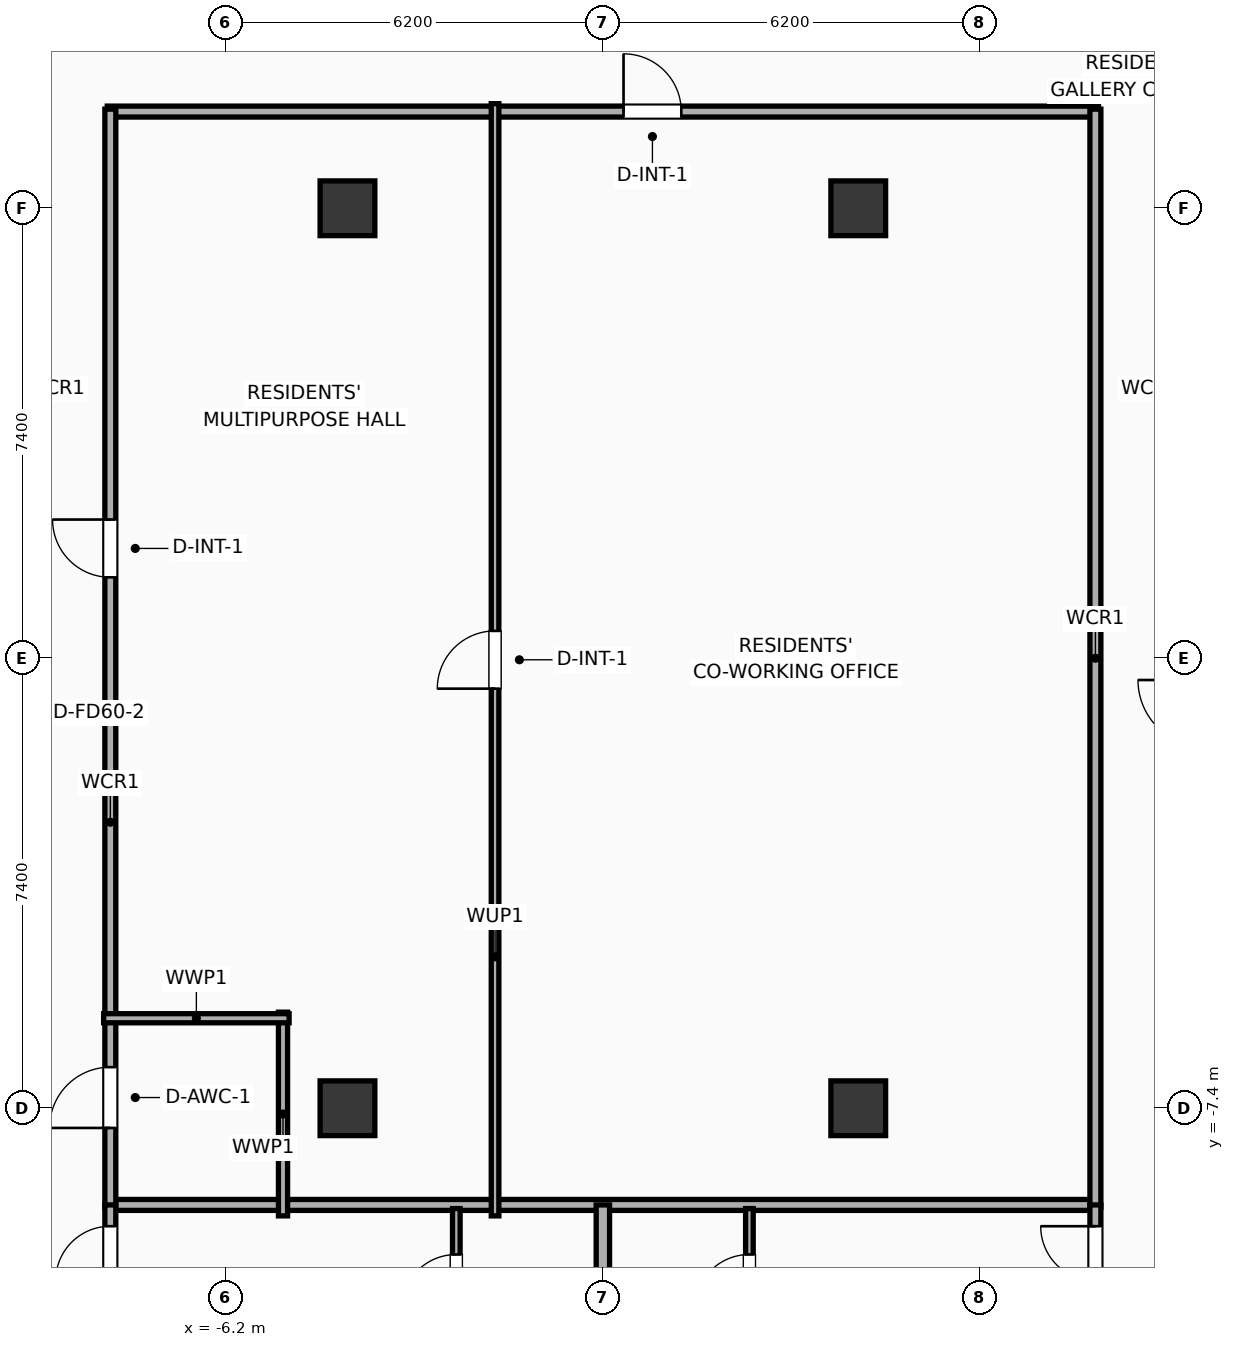
"""IFC4 building model, lengths in metres.
Left out: names, types, materials, properties, quantities, classifications, styles, units other than length and angle.
Written with IfcOpenShell. Run it as: python <this file> out.ifc"""

import sys

from ifc_helpers import new_model, si_unit, direction, frame, frame_2d, origin, origin_2d, place, context, subcontext, project, spatial, rectangle, extrude, element, fill, save


model = new_model("IFC4")
c1 = context("Model", 3, precision=1e-05, world=origin(), true_north=direction((0.0, 1.0)))
c2 = subcontext(c1, "Body", "Model", "MODEL_VIEW")
j1 = project(units=[si_unit("LENGTHUNIT", "METRE"), si_unit("PLANEANGLEUNIT", "RADIAN")], contexts=[c1])
p1 = place(None, origin())
s1 = spatial("IfcSite", under=j1, at=p1, CompositionType="ELEMENT")
p2 = place(p1, origin())
s2 = spatial("IfcBuilding", under=s1, at=p2, CompositionType="ELEMENT")
p3 = place(p2, frame((0.0, 0.0, 247.0)))
s3 = spatial("IfcBuildingStorey", under=s2, at=p3, CompositionType="ELEMENT", Elevation=247.0)
for number, where, z_axis, x_axis in (
    (1, (-4.2, -7.4, 0.0), (0.0, 0.0, 1.0), (1.0, 0.0, 0.0)),
    (2, (-4.2, 7.4, 0.0), (0.0, 0.0, 1.0), (1.0, 0.0, 0.0)),
    (3, (4.2, -7.4, 0.0), (0.0, 0.0, 1.0), (1.0, 0.0, 0.0)),
    (4, (4.2, 7.4, 0.0), (0.0, 0.0, 1.0), (1.0, 0.0, 0.0)),
):
    element("IfcColumn", number, at=place(p3, frame(where, z_axis=z_axis, x_axis=x_axis)), inside=s3, PredefinedType="COLUMN", context=c2, shape_type="SweptSolid", body=[
        extrude(rectangle(XDim=0.9, YDim=0.9, at=origin_2d()), origin(), (0.0, 0.0, 1.0), 3.9),
    ])
p4 = place(p3, frame((-8.15, 8.99, 0.0), z_axis=(0.0, 0.0, 1.0), x_axis=(1.0, 0.0, 0.0)))
e5 = element("IfcWall", 5, at=p4, inside=s3, PredefinedType="PARTITIONING", context=c2, shape_type="SweptSolid", body=[
    extrude(rectangle(XDim=16.3, YDim=0.18, at=frame_2d((8.15, 0.0))), origin(), (0.0, 0.0, 1.0), 3.65),
])
p5 = place(p4, frame((8.49, 0.0, 0.0)))
e6 = element("IfcOpeningElement", 6, at=p5, cuts=e5, PredefinedType="OPENING", context=c2, shape_type="SweptSolid", body=[
    extrude(rectangle(XDim=0.95, YDim=2.05, at=frame_2d((0.475, 1.025))), frame((0.0, 0.1, 0.0), z_axis=(0.0, -1.0, 0.0), x_axis=(1.0, 0.0, 0.0)), (0.0, 0.0, 1.0), 0.2),
])
p6 = place(p3, frame((-8.15, -8.99, 0.0), z_axis=(0.0, 0.0, 1.0), x_axis=(1.0, 0.0, 0.0)))
e7 = element("IfcWall", 7, at=p6, inside=s3, PredefinedType="PARTITIONING", context=c2, shape_type="SweptSolid", body=[
    extrude(rectangle(XDim=16.3, YDim=0.18, at=frame_2d((8.15, 0.0))), origin(), (0.0, 0.0, 1.0), 3.65),
])
p7 = place(p3, frame((-8.1, -9.03, 0.0), z_axis=(0.0, 0.0, 1.0), x_axis=(0.0, 1.0, 0.0)))
e8 = element("IfcWall", 8, at=p7, inside=s3, PredefinedType="PARTITIONING", context=c2, shape_type="SweptSolid", body=[
    extrude(rectangle(XDim=18.06, YDim=0.18, at=frame_2d((9.03, 0.0))), origin(), (0.0, 0.0, 1.0), 3.65),
])
p8 = place(p7, frame((1.306, 0.0, 0.0)))
e9 = element("IfcOpeningElement", 9, at=p8, cuts=e8, PredefinedType="OPENING", context=c2, shape_type="SweptSolid", body=[
    extrude(rectangle(XDim=1.0, YDim=2.05, at=frame_2d((0.5, 1.025))), frame((0.0, 0.1, 0.0), z_axis=(0.0, -1.0, 0.0), x_axis=(1.0, 0.0, 0.0)), (0.0, 0.0, 1.0), 0.2),
])
p9 = place(p7, frame((10.361, 0.0, 0.0)))
e10 = element("IfcOpeningElement", 10, at=p9, cuts=e8, PredefinedType="OPENING", context=c2, shape_type="SweptSolid", body=[
    extrude(rectangle(XDim=0.95, YDim=2.05, at=frame_2d((0.475, 1.025))), frame((0.0, 0.1, 0.0), z_axis=(0.0, -1.0, 0.0), x_axis=(1.0, 0.0, 0.0)), (0.0, 0.0, 1.0), 0.2),
])
p10 = place(p3, frame((8.1, -9.03, 0.0), z_axis=(0.0, 0.0, 1.0), x_axis=(0.0, 1.0, 0.0)))
e11 = element("IfcWall", 11, at=p10, inside=s3, PredefinedType="PARTITIONING", context=c2, shape_type="SweptSolid", body=[
    extrude(rectangle(XDim=18.06, YDim=0.18, at=frame_2d((9.03, 0.0))), origin(), (0.0, 0.0, 1.0), 3.65),
])
p11 = place(p3, frame((-5.26, -9.17, 0.0), z_axis=(0.0, 0.0, 1.0), x_axis=(0.0, 1.0, 0.0)))
e12 = element("IfcWall", 12, at=p11, inside=s3, PredefinedType="PLUMBINGWALL", context=c2, shape_type="SweptSolid", body=[
    extrude(rectangle(XDim=3.35, YDim=0.15, at=frame_2d((1.675, 0.0))), origin(), (0.0, 0.0, 1.0), 3.65),
])
p12 = place(p3, frame((-8.21, -5.92, 0.0), z_axis=(0.0, 0.0, 1.0), x_axis=(1.0, 0.0, 0.0)))
e13 = element("IfcWall", 13, at=p12, inside=s3, PredefinedType="PLUMBINGWALL", context=c2, shape_type="SweptSolid", body=[
    extrude(rectangle(XDim=3.05, YDim=0.15, at=frame_2d((1.525, 0.0))), origin(), (0.0, 0.0, 1.0), 3.65),
])
p13 = place(p3, frame((-1.773, -9.17, 0.0), z_axis=(0.0, 0.0, 1.0), x_axis=(0.0, 1.0, 0.0)))
e14 = element("IfcWall", 14, at=p13, inside=s3, PredefinedType="PARTITIONING", context=c2, shape_type="SweptSolid", body=[
    extrude(rectangle(XDim=18.29, YDim=0.125, at=frame_2d((9.145, 0.0))), origin(), (0.0, 0.0, 1.0), 3.65),
])
p14 = place(p13, frame((8.67, 0.0, 0.0)))
e15 = element("IfcOpeningElement", 15, at=p14, cuts=e14, PredefinedType="OPENING", context=c2, shape_type="SweptSolid", body=[
    extrude(rectangle(XDim=0.95, YDim=2.05, at=frame_2d((0.475, 1.025))), frame((0.0, 0.073, 0.0), z_axis=(0.0, -1.0, 0.0), x_axis=(1.0, 0.0, 0.0)), (0.0, 0.0, 1.0), 0.145),
])
p15 = place(p3, frame((-2.41, -11.46, 0.0), z_axis=(0.0, 0.0, 1.0), x_axis=(0.0, 1.0, 0.0)))
e16 = element("IfcWall", 16, at=p15, inside=s3, PredefinedType="PARTITIONING", context=c2, shape_type="SweptSolid", body=[
    extrude(rectangle(XDim=2.41, YDim=0.125, at=frame_2d((1.205, 0.0))), origin(), (0.0, 0.0, 1.0), 3.65),
])
p16 = place(p15, frame((0.755, 0.0, 0.0)))
e17 = element("IfcOpeningElement", 17, at=p16, cuts=e16, PredefinedType="OPENING", context=c2, shape_type="SweptSolid", body=[
    extrude(rectangle(XDim=0.9, YDim=2.05, at=frame_2d((0.45, 1.025))), frame((0.0, 0.073, 0.0), z_axis=(0.0, -1.0, 0.0), x_axis=(1.0, 0.0, 0.0)), (0.0, 0.0, 1.0), 0.145),
])
p17 = place(p3, frame((-8.1, -18.83, 0.0), z_axis=(0.0, 0.0, 1.0), x_axis=(0.0, 1.0, 0.0)))
e18 = element("IfcWall", 18, at=p17, inside=s3, PredefinedType="PARTITIONING", context=c2, shape_type="SweptSolid", body=[
    extrude(rectangle(XDim=9.84, YDim=0.18, at=frame_2d((4.92, 0.0))), origin(), (0.0, 0.0, 1.0), 3.65),
])
p18 = place(p17, frame((8.59, 0.0, 0.0)))
e19 = element("IfcOpeningElement", 19, at=p18, cuts=e18, PredefinedType="OPENING", context=c2, shape_type="SweptSolid", body=[
    extrude(rectangle(XDim=0.9, YDim=2.05, at=frame_2d((0.45, 1.025))), frame((0.0, 0.1, 0.0), z_axis=(0.0, -1.0, 0.0), x_axis=(1.0, 0.0, 0.0)), (0.0, 0.0, 1.0), 0.2),
])
p19 = place(p3, frame((2.41, -11.46, 0.0), z_axis=(0.0, 0.0, 1.0), x_axis=(0.0, 1.0, 0.0)))
e20 = element("IfcWall", 20, at=p19, inside=s3, PredefinedType="PARTITIONING", context=c2, shape_type="SweptSolid", body=[
    extrude(rectangle(XDim=2.41, YDim=0.125, at=frame_2d((1.205, 0.0))), origin(), (0.0, 0.0, 1.0), 3.65),
])
p20 = place(p19, frame((0.755, 0.0, 0.0)))
e21 = element("IfcOpeningElement", 21, at=p20, cuts=e20, PredefinedType="OPENING", context=c2, shape_type="SweptSolid", body=[
    extrude(rectangle(XDim=0.9, YDim=2.05, at=frame_2d((0.45, 1.025))), frame((0.0, 0.073, 0.0), z_axis=(0.0, -1.0, 0.0), x_axis=(1.0, 0.0, 0.0)), (0.0, 0.0, 1.0), 0.145),
])
p21 = place(p3, frame((8.1, -18.83, 0.0), z_axis=(0.0, 0.0, 1.0), x_axis=(0.0, 1.0, 0.0)))
e22 = element("IfcWall", 22, at=p21, inside=s3, PredefinedType="PARTITIONING", context=c2, shape_type="SweptSolid", body=[
    extrude(rectangle(XDim=9.84, YDim=0.18, at=frame_2d((4.92, 0.0))), origin(), (0.0, 0.0, 1.0), 3.65),
])
p22 = place(p21, frame((8.59, 0.0, 0.0)))
e23 = element("IfcOpeningElement", 23, at=p22, cuts=e22, PredefinedType="OPENING", context=c2, shape_type="SweptSolid", body=[
    extrude(rectangle(XDim=0.9, YDim=2.05, at=frame_2d((0.45, 1.025))), frame((0.0, 0.1, 0.0), z_axis=(0.0, -1.0, 0.0), x_axis=(1.0, 0.0, 0.0)), (0.0, 0.0, 1.0), 0.2),
])
p23 = place(p3, frame((0.0, -18.83, 0.0), z_axis=(0.0, 0.0, 1.0), x_axis=(0.0, 1.0, 0.0)))
e24 = element("IfcWall", 24, at=p23, inside=s3, PredefinedType="PARTITIONING", context=c2, shape_type="SweptSolid", body=[
    extrude(rectangle(XDim=9.84, YDim=0.22, at=frame_2d((4.92, 0.0))), origin(), (0.0, 0.0, 1.0), 3.65),
])
p24 = place(p5, origin())
e25 = element("IfcDoor", 25, at=p24, inside=s3, OperationType="SINGLE_SWING_LEFT", PredefinedType="DOOR", context=c2, shape_type="SweptSolid", body=[
    extrude(rectangle(XDim=0.95, YDim=2.05, at=frame_2d((0.475, 1.025))), frame((0.0, 0.025, 0.0), z_axis=(0.0, -1.0, 0.0), x_axis=(1.0, 0.0, 0.0)), (0.0, 0.0, 1.0), 0.05),
])
fill(e6, e25)
p25 = place(p8, origin())
e26 = element("IfcDoor", 26, at=p25, inside=s3, OperationType="SINGLE_SWING_LEFT", PredefinedType="DOOR", context=c2, shape_type="SweptSolid", body=[
    extrude(rectangle(XDim=1.0, YDim=2.05, at=frame_2d((0.5, 1.025))), frame((0.0, 0.025, 0.0), z_axis=(0.0, -1.0, 0.0), x_axis=(1.0, 0.0, 0.0)), (0.0, 0.0, 1.0), 0.05),
])
fill(e9, e26)
p26 = place(p9, origin())
e27 = element("IfcDoor", 27, at=p26, inside=s3, OperationType="SINGLE_SWING_RIGHT", PredefinedType="DOOR", context=c2, shape_type="SweptSolid", body=[
    extrude(rectangle(XDim=0.95, YDim=2.05, at=frame_2d((0.475, 1.025))), frame((0.0, 0.025, 0.0), z_axis=(0.0, -1.0, 0.0), x_axis=(1.0, 0.0, 0.0)), (0.0, 0.0, 1.0), 0.05),
])
fill(e10, e27)
p27 = place(p14, origin())
e28 = element("IfcDoor", 28, at=p27, inside=s3, OperationType="SINGLE_SWING_LEFT", PredefinedType="DOOR", context=c2, shape_type="SweptSolid", body=[
    extrude(rectangle(XDim=0.95, YDim=2.05, at=frame_2d((0.475, 1.025))), frame((0.0, 0.025, 0.0), z_axis=(0.0, -1.0, 0.0), x_axis=(1.0, 0.0, 0.0)), (0.0, 0.0, 1.0), 0.05),
])
fill(e15, e28)
p28 = place(p16, origin())
e29 = element("IfcDoor", 29, at=p28, inside=s3, OperationType="SINGLE_SWING_LEFT", PredefinedType="DOOR", context=c2, shape_type="SweptSolid", body=[
    extrude(rectangle(XDim=0.9, YDim=2.05, at=frame_2d((0.45, 1.025))), frame((0.0, 0.025, 0.0), z_axis=(0.0, -1.0, 0.0), x_axis=(1.0, 0.0, 0.0)), (0.0, 0.0, 1.0), 0.05),
])
fill(e17, e29)
p29 = place(p18, origin())
e30 = element("IfcDoor", 30, at=p29, inside=s3, OperationType="SINGLE_SWING_LEFT", PredefinedType="DOOR", context=c2, shape_type="SweptSolid", body=[
    extrude(rectangle(XDim=0.9, YDim=2.05, at=frame_2d((0.45, 1.025))), frame((0.0, 0.025, 0.0), z_axis=(0.0, -1.0, 0.0), x_axis=(1.0, 0.0, 0.0)), (0.0, 0.0, 1.0), 0.05),
])
fill(e19, e30)
p30 = place(p20, origin())
e31 = element("IfcDoor", 31, at=p30, inside=s3, OperationType="SINGLE_SWING_LEFT", PredefinedType="DOOR", context=c2, shape_type="SweptSolid", body=[
    extrude(rectangle(XDim=0.9, YDim=2.05, at=frame_2d((0.45, 1.025))), frame((0.0, 0.025, 0.0), z_axis=(0.0, -1.0, 0.0), x_axis=(1.0, 0.0, 0.0)), (0.0, 0.0, 1.0), 0.05),
])
fill(e21, e31)
p31 = place(p22, origin())
e32 = element("IfcDoor", 32, at=p31, inside=s3, OperationType="SINGLE_SWING_RIGHT", PredefinedType="DOOR", context=c2, shape_type="SweptSolid", body=[
    extrude(rectangle(XDim=0.9, YDim=2.05, at=frame_2d((0.45, 1.025))), frame((0.0, 0.025, 0.0), z_axis=(0.0, -1.0, 0.0), x_axis=(1.0, 0.0, 0.0)), (0.0, 0.0, 1.0), 0.05),
])
fill(e23, e32)
save(model, sys.argv[1])
